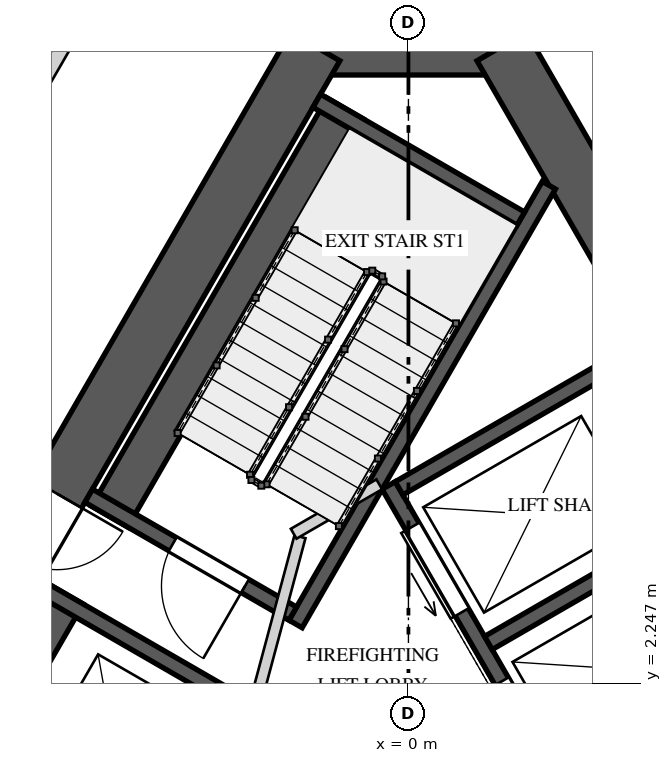
"""IFC4 building model, lengths in metres.
Left out: names, types, materials, properties, quantities, classifications, styles, units other than length and angle.
Written with IfcOpenShell. Run it as: python <this file> out.ifc"""

import sys

from ifc_helpers import new_model, si_unit, direction, frame, frame_2d, origin, place, context, subcontext, project, spatial, rectangle, extrude, element, fill, save


model = new_model("IFC4")
c1 = context("Model", 3, precision=1e-05, world=origin(), true_north=direction((0.0, 1.0)))
c2 = subcontext(c1, "Body", "Model", "MODEL_VIEW")
j1 = project(units=[si_unit("LENGTHUNIT", "METRE"), si_unit("PLANEANGLEUNIT", "RADIAN")], contexts=[c1])
p1 = place(None, origin())
s1 = spatial("IfcSite", under=j1, at=p1, CompositionType="ELEMENT")
p2 = place(p1, origin())
s2 = spatial("IfcBuilding", under=s1, at=p2, CompositionType="ELEMENT")
p3 = place(p2, frame((0.0, 0.0, 200.0)))
s3 = spatial("IfcBuildingStorey", under=s2, at=p3, CompositionType="ELEMENT", Elevation=200.0)
p4 = place(p3, frame((1.443, 10.625, 0.0), z_axis=(0.0, 0.0, 1.0), x_axis=(-1.0, 0.0, 0.0)))
e1 = element("IfcWall", 1, at=p4, inside=s3, PredefinedType="SHEAR", context=c2, shape_type="SweptSolid", body=[
    extrude(rectangle(XDim=2.887, YDim=0.75, at=frame_2d((1.443, 0.0))), origin(), (0.0, 0.0, 1.0), 4.0),
])
p5 = place(p3, frame((-1.227, 10.625, 0.0), z_axis=(0.0, 0.0, 1.0), x_axis=(-0.500002161919, -0.866024155596, 0.0)))
e2 = element("IfcWall", 2, at=p5, inside=s3, PredefinedType="SHEAR", context=c2, shape_type="SweptSolid", body=[
    extrude(rectangle(XDim=17.176, YDim=0.75, at=frame_2d((8.588, 0.0))), origin(), (0.0, 0.0, 1.0), 4.0),
])
p6 = place(p5, frame((6.793, 0.0, 0.0)))
e3 = element("IfcOpeningElement", 3, at=p6, cuts=e2, PredefinedType="OPENING", context=c2, shape_type="SweptSolid", body=[
    extrude(rectangle(XDim=1.0, YDim=2.4, at=frame_2d((0.5, 1.2))), frame((0.0, 0.385, 0.0), z_axis=(0.0, -1.0, 0.0), x_axis=(1.0, 0.0, 0.0)), (0.0, 0.0, 1.0), 0.77),
])
p7 = place(p5, frame((14.864, 0.0, 0.0)))
e4 = element("IfcOpeningElement", 4, at=p7, cuts=e2, PredefinedType="OPENING", context=c2, shape_type="SweptSolid", body=[
    extrude(rectangle(XDim=0.8, YDim=2.1, at=frame_2d((0.4, 1.05))), frame((0.0, 0.385, 0.0), z_axis=(0.0, -1.0, 0.0), x_axis=(1.0, 0.0, 0.0)), (0.0, 0.0, 1.0), 0.77),
])
p8 = place(p3, frame((9.815, -4.25, 0.0), z_axis=(0.0, 0.0, 1.0), x_axis=(-0.500002161919, 0.866024155596, 0.0)))
e5 = element("IfcWall", 5, at=p8, inside=s3, PredefinedType="SHEAR", context=c2, shape_type="SweptSolid", body=[
    extrude(rectangle(XDim=17.176, YDim=0.75, at=frame_2d((8.588, 0.0))), origin(), (0.0, 0.0, 1.0), 4.0),
])
p9 = place(p8, frame((6.863, 0.0, 0.0)))
e6 = element("IfcOpeningElement", 6, at=p9, cuts=e5, PredefinedType="OPENING", context=c2, shape_type="SweptSolid", body=[
    extrude(rectangle(XDim=1.0, YDim=2.4, at=frame_2d((0.5, 1.2))), frame((0.0, 0.385, 0.0), z_axis=(0.0, -1.0, 0.0), x_axis=(1.0, 0.0, 0.0)), (0.0, 0.0, 1.0), 0.77),
])
p10 = place(p3, frame((-0.831, 9.81, 0.0), z_axis=(0.0, 0.0, 1.0), x_axis=(-0.500009909098, -0.866019682689, 0.0)))
e7 = element("IfcWall", 7, at=p10, inside=s3, PredefinedType="SOLIDWALL", context=c2, shape_type="SweptSolid", body=[
    extrude(rectangle(XDim=6.2, YDim=0.55, at=frame_2d((3.1, 0.0))), origin(), (0.0, 0.0, 1.0), 3.65),
])
p11 = place(p3, frame((1.847, 8.8, 0.0), z_axis=(0.0, 0.0, 1.0), x_axis=(-0.499980354584, -0.866036745774, 0.0)))
e8 = element("IfcWall", 8, at=p11, inside=s3, PredefinedType="SOLIDWALL", context=c2, shape_type="SweptSolid", body=[
    extrude(rectangle(XDim=6.665, YDim=0.2, at=frame_2d((3.333, 0.0))), origin(), (0.0, 0.0, 1.0), 3.65),
])
p12 = place(p3, frame((1.479, 8.361, 0.0), z_axis=(0.0, 0.0, 1.0), x_axis=(-0.86600983753, 0.500026960575, 0.0)))
e9 = element("IfcWall", 9, at=p12, inside=s3, PredefinedType="SOLIDWALL", context=c2, shape_type="SweptSolid", body=[
    extrude(rectangle(XDim=3.1, YDim=0.2, at=frame_2d((1.55, 0.0))), origin(), (0.0, 0.0, 1.0), 3.65),
])
p13 = place(p3, frame((-1.521, 3.165, 0.0), z_axis=(0.0, 0.0, 1.0), x_axis=(-0.86600983753, 0.500026960575, 0.0)))
e10 = element("IfcWall", 10, at=p13, inside=s3, PredefinedType="SOLIDWALL", context=c2, shape_type="SweptSolid", body=[
    extrude(rectangle(XDim=3.1, YDim=0.2, at=frame_2d((1.55, 0.0))), origin(), (0.0, 0.0, 1.0), 3.65),
])
p14 = place(p13, frame((0.725, 0.0, 0.0)))
e11 = element("IfcOpeningElement", 11, at=p14, cuts=e10, PredefinedType="OPENING", context=c2, shape_type="SweptSolid", body=[
    extrude(rectangle(XDim=1.1, YDim=2.4, at=frame_2d((0.55, 1.2))), frame((0.0, 0.11, 0.0), z_axis=(0.0, -1.0, 0.0), x_axis=(1.0, 0.0, 0.0)), (0.0, 0.0, 1.0), 0.22),
])
p15 = place(p3, frame((-4.516, 3.427, 0.0), z_axis=(0.0, 0.0, 1.0), x_axis=(-0.499996545922, -0.866027397988, 0.0)))
e12 = element("IfcWall", 12, at=p15, inside=s3, PredefinedType="SOLIDWALL", context=c2, shape_type="SweptSolid", body=[
    extrude(rectangle(XDim=5.5, YDim=0.55, at=frame_2d((2.75, 0.0))), origin(), (0.0, 0.0, 1.0), 3.65),
])
p16 = place(p3, frame((-2.38, 2.078, 0.0), z_axis=(0.0, 0.0, 1.0), x_axis=(-0.866032775405, 0.499987231761, 0.0)))
e13 = element("IfcWall", 13, at=p16, inside=s3, PredefinedType="SOLIDWALL", context=c2, shape_type="SweptSolid", body=[
    extrude(rectangle(XDim=2.9, YDim=0.2, at=frame_2d((1.45, 0.0))), origin(), (0.0, 0.0, 1.0), 3.65),
])
p17 = place(p3, frame((2.19, 0.606, 0.0), z_axis=(0.0, 0.0, 1.0), x_axis=(-0.500002801628, 0.866023786258, 0.0)))
e14 = element("IfcWall", 14, at=p17, inside=s3, PredefinedType="SOLIDWALL", context=c2, shape_type="SweptSolid", body=[
    extrude(rectangle(XDim=4.9, YDim=0.2, at=frame_2d((2.45, 0.0))), origin(), (0.0, 0.0, 1.0), 3.65),
])
p18 = place(p17, frame((0.625, 0.0, 0.0)))
e15 = element("IfcOpeningElement", 15, at=p18, cuts=e14, PredefinedType="OPENING", context=c2, shape_type="SweptSolid", body=[
    extrude(rectangle(XDim=1.3, YDim=2.1, at=frame_2d((0.65, 1.05))), frame((0.0, 0.11, 0.0), z_axis=(0.0, -1.0, 0.0), x_axis=(1.0, 0.0, 0.0)), (0.0, 0.0, 1.0), 0.22),
])
p19 = place(p17, frame((2.975, 0.0, 0.0)))
e16 = element("IfcOpeningElement", 16, at=p19, cuts=e14, PredefinedType="OPENING", context=c2, shape_type="SweptSolid", body=[
    extrude(rectangle(XDim=1.3, YDim=2.1, at=frame_2d((0.65, 1.05))), frame((0.0, 0.11, 0.0), z_axis=(0.0, -1.0, 0.0), x_axis=(1.0, 0.0, 0.0)), (0.0, 0.0, 1.0), 0.22),
])
for number, where, z_axis, x_axis in (
    (17, (2.227, 0.743, 0.0), (0.0, 0.0, 1.0), (0.866, 0.5, 0.0)),
    (18, (1.052, 2.778, 0.0), (0.0, 0.0, 1.0), (0.866, 0.5, 0.0)),
):
    element("IfcWall", number, at=place(p3, frame(where, z_axis=z_axis, x_axis=x_axis)), inside=s3, PredefinedType="SOLIDWALL", context=c2, shape_type="SweptSolid", body=[
        extrude(rectangle(XDim=3.7, YDim=0.2, at=frame_2d((1.85, 0.0))), origin(), (0.0, 0.0, 1.0), 3.65),
    ])
p20 = place(p3, frame((-0.123, 4.813, 0.0), z_axis=(0.0, 0.0, 1.0), x_axis=(0.866000971088, 0.500042316284, 0.0)))
e19 = element("IfcWall", 19, at=p20, inside=s3, PredefinedType="SOLIDWALL", context=c2, shape_type="SweptSolid", body=[
    extrude(rectangle(XDim=3.7, YDim=0.2, at=frame_2d((1.85, 0.0))), origin(), (0.0, 0.0, 1.0), 3.65),
])
p21 = place(p3, frame((-2.178, 1.372, 0.0), z_axis=(0.0, 0.0, 1.0), x_axis=(0.258808958833, 0.96592852884, 0.0)))
e20 = element("IfcWall", 20, at=p21, inside=s3, PredefinedType="PARTITIONING", context=c2, shape_type="SweptSolid", body=[
    extrude(rectangle(XDim=2.903, YDim=0.15, at=frame_2d((1.451, 0.0))), origin(), (0.0, 0.0, 1.0), 3.65),
])
p22 = place(p3, frame((-1.51, 4.215, 0.0), z_axis=(0.0, 0.0, 1.0), x_axis=(0.866085525409, 0.49989585183, 0.0)))
e21 = element("IfcWall", 21, at=p22, inside=s3, PredefinedType="PARTITIONING", context=c2, shape_type="SweptSolid", body=[
    extrude(rectangle(XDim=1.3, YDim=0.15, at=frame_2d((0.65, 0.0))), origin(), (0.0, 0.0, 1.0), 3.65),
])
p23 = place(p3, frame((-5.017, 9.811, 0.0), z_axis=(0.0, 0.0, 1.0), x_axis=(0.499993700073, 0.866029041019, 0.0)))
e22 = element("IfcWall", 22, at=p23, inside=s3, PredefinedType="SOLIDWALL", context=c2, shape_type="SweptSolid", body=[
    extrude(rectangle(XDim=4.155, YDim=0.2, at=frame_2d((2.078, 0.0))), origin(), (0.0, 0.0, 1.0), 3.65),
])
p24 = place(p14, origin())
e23 = element("IfcDoor", 23, at=p24, inside=s3, OperationType="SINGLE_SWING_RIGHT", PredefinedType="DOOR", context=c2, shape_type="SweptSolid", body=[
    extrude(rectangle(XDim=1.1, YDim=2.4, at=frame_2d((0.55, 1.2))), frame((0.0, 0.025, 0.0), z_axis=(0.0, -1.0, 0.0), x_axis=(1.0, 0.0, 0.0)), (0.0, 0.0, 1.0), 0.05),
])
fill(e11, e23)
p25 = place(p18, origin())
e24 = element("IfcDoor", 24, at=p25, inside=s3, OperationType="SLIDING_TO_RIGHT", PredefinedType="DOOR", context=c2, shape_type="SweptSolid", body=[
    extrude(rectangle(XDim=1.3, YDim=2.1, at=frame_2d((0.65, 1.05))), frame((0.0, 0.025, 0.0), z_axis=(0.0, -1.0, 0.0), x_axis=(1.0, 0.0, 0.0)), (0.0, 0.0, 1.0), 0.05),
])
fill(e15, e24)
p26 = place(p19, origin())
e25 = element("IfcDoor", 25, at=p26, inside=s3, OperationType="SLIDING_TO_LEFT", PredefinedType="DOOR", context=c2, shape_type="SweptSolid", body=[
    extrude(rectangle(XDim=1.3, YDim=2.1, at=frame_2d((0.65, 1.05))), frame((0.0, 0.025, 0.0), z_axis=(0.0, -1.0, 0.0), x_axis=(1.0, 0.0, 0.0)), (0.0, 0.0, 1.0), 0.05),
])
fill(e16, e25)
p27 = place(p6, origin())
e26 = element("IfcDoor", 26, at=p27, inside=s3, OperationType="SINGLE_SWING_LEFT", PredefinedType="DOOR", context=c2, shape_type="SweptSolid", body=[
    extrude(rectangle(XDim=1.0, YDim=2.4, at=frame_2d((0.5, 1.2))), frame((0.0, 0.025, 0.0), z_axis=(0.0, -1.0, 0.0), x_axis=(1.0, 0.0, 0.0)), (0.0, 0.0, 1.0), 0.05),
])
fill(e3, e26)
save(model, sys.argv[1])
